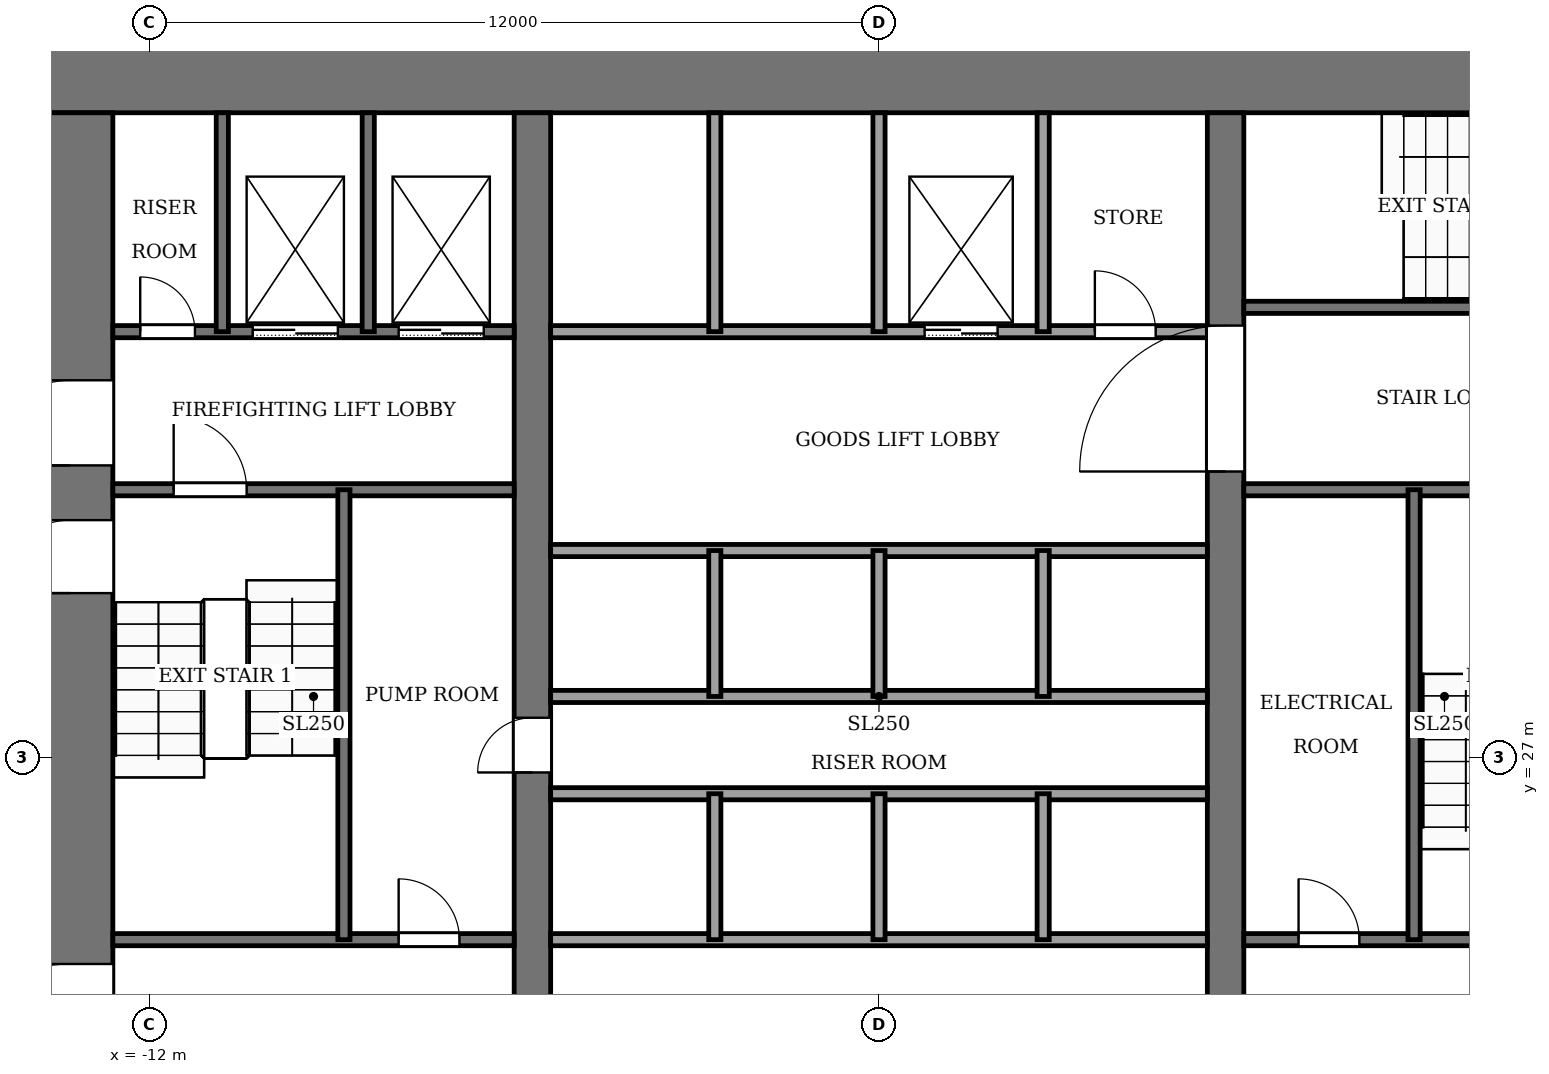
"""IFC4 building model, lengths in metres.
Left out: names, types, materials, properties, quantities, classifications, styles, units other than length and angle.
Written with IfcOpenShell. Run it as: python <this file> out.ifc"""

import sys

from ifc_helpers import new_model, si_unit, direction, frame, frame_2d, origin, place, context, subcontext, project, spatial, rectangle, extrude, element, fill, save


model = new_model("IFC4")
c1 = context("Model", 3, precision=1e-05, world=origin(), true_north=direction((0.0, 1.0)))
c2 = subcontext(c1, "Body", "Model", "MODEL_VIEW")
j1 = project(units=[si_unit("LENGTHUNIT", "METRE"), si_unit("PLANEANGLEUNIT", "RADIAN")], contexts=[c1])
p1 = place(None, origin())
s1 = spatial("IfcSite", under=j1, at=p1, CompositionType="ELEMENT")
p2 = place(p1, origin())
s2 = spatial("IfcBuilding", under=s1, at=p2, CompositionType="ELEMENT")
p3 = place(p2, frame((0.0, 0.0, -6.0)))
s3 = spatial("IfcBuildingStorey", under=s2, at=p3, CompositionType="ELEMENT", Elevation=-6.0)
p4 = place(p3, frame((-14.0, 38.3, 0.0), z_axis=(0.0, 0.0, 1.0), x_axis=(1.0, 0.0, 0.0)))
e1 = element("IfcWall", 1, at=p4, inside=s3, PredefinedType="SHEAR", context=c2, shape_type="SweptSolid", body=[
    extrude(rectangle(XDim=28.0, YDim=1.4, at=frame_2d((14.0, 0.0))), origin(), (0.0, 0.0, 1.0), 5.55),
])
p5 = place(p3, frame((-13.3, 18.4, 0.0), z_axis=(0.0, 0.0, 1.0), x_axis=(0.0, 1.0, 0.0)))
e2 = element("IfcWall", 2, at=p5, inside=s3, PredefinedType="SHEAR", context=c2, shape_type="SweptSolid", body=[
    extrude(rectangle(XDim=19.2, YDim=1.4, at=frame_2d((9.6, 0.0))), origin(), (0.0, 0.0, 1.0), 5.55),
])
p6 = place(p5, frame((2.8, 0.0, 0.0)))
e3 = element("IfcOpeningElement", 3, at=p6, cuts=e2, PredefinedType="OPENING", context=c2, shape_type="SweptSolid", body=[
    extrude(rectangle(XDim=2.4, YDim=2.4, at=frame_2d((1.2, 1.2))), frame((0.0, 0.71, 0.0), z_axis=(0.0, -1.0, 0.0), x_axis=(1.0, 0.0, 0.0)), (0.0, 0.0, 1.0), 1.42),
])
p7 = place(p5, frame((13.4, 0.0, 0.0)))
e4 = element("IfcOpeningElement", 4, at=p7, cuts=e2, PredefinedType="OPENING", context=c2, shape_type="SweptSolid", body=[
    extrude(rectangle(XDim=1.4, YDim=2.2, at=frame_2d((0.7, 1.1))), frame((0.0, 0.71, 0.0), z_axis=(0.0, -1.0, 0.0), x_axis=(1.0, 0.0, 0.0)), (0.0, 0.0, 1.0), 1.42),
])
p8 = place(p5, frame((11.3, 0.0, 0.0)))
e5 = element("IfcOpeningElement", 5, at=p8, cuts=e2, PredefinedType="OPENING", context=c2, shape_type="SweptSolid", body=[
    extrude(rectangle(XDim=1.2, YDim=2.2, at=frame_2d((0.6, 1.1))), frame((0.0, 0.71, 0.0), z_axis=(0.0, -1.0, 0.0), x_axis=(1.0, 0.0, 0.0)), (0.0, 0.0, 1.0), 1.42),
])
p9 = place(p3, frame((-5.7, 18.4, 0.0), z_axis=(0.0, 0.0, 1.0), x_axis=(0.0, 1.0, 0.0)))
e6 = element("IfcWall", 6, at=p9, inside=s3, PredefinedType="SHEAR", context=c2, shape_type="SweptSolid", body=[
    extrude(rectangle(XDim=19.2, YDim=0.6, at=frame_2d((9.6, 0.0))), origin(), (0.0, 0.0, 1.0), 5.55),
])
p10 = place(p9, frame((8.35, 0.0, 0.0)))
e7 = element("IfcOpeningElement", 7, at=p10, cuts=e6, PredefinedType="OPENING", context=c2, shape_type="SweptSolid", body=[
    extrude(rectangle(XDim=0.9, YDim=2.1, at=frame_2d((0.45, 1.05))), frame((0.0, 0.31, 0.0), z_axis=(0.0, -1.0, 0.0), x_axis=(1.0, 0.0, 0.0)), (0.0, 0.0, 1.0), 0.62),
])
p11 = place(p3, frame((5.7, 18.4, 0.0), z_axis=(0.0, 0.0, 1.0), x_axis=(0.0, 1.0, 0.0)))
e8 = element("IfcWall", 8, at=p11, inside=s3, PredefinedType="SHEAR", context=c2, shape_type="SweptSolid", body=[
    extrude(rectangle(XDim=19.2, YDim=0.6, at=frame_2d((9.6, 0.0))), origin(), (0.0, 0.0, 1.0), 5.55),
])
p12 = place(p11, frame((13.3, 0.0, 0.0)))
e9 = element("IfcOpeningElement", 9, at=p12, cuts=e8, PredefinedType="OPENING", context=c2, shape_type="SweptSolid", body=[
    extrude(rectangle(XDim=2.4, YDim=2.4, at=frame_2d((1.2, 1.2))), frame((0.0, 0.31, 0.0), z_axis=(0.0, -1.0, 0.0), x_axis=(1.0, 0.0, 0.0)), (0.0, 0.0, 1.0), 0.62),
])
p13 = place(p3, frame((-12.6, 24.0, 0.0), z_axis=(0.0, 0.0, 1.0), x_axis=(1.0, 0.0, 0.0)))
e10 = element("IfcWall", 10, at=p13, inside=s3, PredefinedType="PARTITIONING", context=c2, shape_type="SweptSolid", body=[
    extrude(rectangle(XDim=6.6, YDim=0.2, at=frame_2d((3.3, 0.0))), origin(), (0.0, 0.0, 1.0), 5.55),
])
p14 = place(p13, frame((4.7, 0.0, 0.0)))
e11 = element("IfcOpeningElement", 11, at=p14, cuts=e10, PredefinedType="OPENING", context=c2, shape_type="SweptSolid", body=[
    extrude(rectangle(XDim=1.0, YDim=2.1, at=frame_2d((0.5, 1.05))), frame((0.0, 0.11, 0.0), z_axis=(0.0, -1.0, 0.0), x_axis=(1.0, 0.0, 0.0)), (0.0, 0.0, 1.0), 0.22),
])
p15 = place(p3, frame((-5.4, 24.0, 0.0), z_axis=(0.0, 0.0, 1.0), x_axis=(1.0, 0.0, 0.0)))
e12 = element("IfcWall", 12, at=p15, inside=s3, PredefinedType="PARTITIONING", context=c2, shape_type="SweptSolid", body=[
    extrude(rectangle(XDim=10.8, YDim=0.2, at=frame_2d((5.4, 0.0))), origin(), (0.0, 0.0, 1.0), 5.55),
])
p16 = place(p3, frame((6.0, 24.0, 0.0), z_axis=(0.0, 0.0, 1.0), x_axis=(1.0, 0.0, 0.0)))
e13 = element("IfcWall", 13, at=p16, inside=s3, PredefinedType="PARTITIONING", context=c2, shape_type="SweptSolid", body=[
    extrude(rectangle(XDim=6.6, YDim=0.2, at=frame_2d((3.3, 0.0))), origin(), (0.0, 0.0, 1.0), 5.55),
])
p17 = place(p16, frame((0.9, 0.0, 0.0)))
e14 = element("IfcOpeningElement", 14, at=p17, cuts=e13, PredefinedType="OPENING", context=c2, shape_type="SweptSolid", body=[
    extrude(rectangle(XDim=1.0, YDim=2.1, at=frame_2d((0.5, 1.05))), frame((0.0, 0.11, 0.0), z_axis=(0.0, -1.0, 0.0), x_axis=(1.0, 0.0, 0.0)), (0.0, 0.0, 1.0), 0.22),
])
p18 = place(p16, frame((4.4, 0.0, 0.0)))
e15 = element("IfcOpeningElement", 15, at=p18, cuts=e13, PredefinedType="OPENING", context=c2, shape_type="SweptSolid", body=[
    extrude(rectangle(XDim=1.2, YDim=2.2, at=frame_2d((0.6, 1.1))), frame((0.0, 0.11, 0.0), z_axis=(0.0, -1.0, 0.0), x_axis=(1.0, 0.0, 0.0)), (0.0, 0.0, 1.0), 0.22),
])
for number, where, z_axis, x_axis in (
    (16, (-5.4, 26.4, 0.0), (0.0, 0.0, 1.0), (1.0, 0.0, 0.0)),
    (17, (-5.4, 28.0, 0.0), (0.0, 0.0, 1.0), (1.0, 0.0, 0.0)),
    (18, (-5.4, 30.4, 0.0), (0.0, 0.0, 1.0), (1.0, 0.0, 0.0)),
):
    element("IfcWall", number, at=place(p3, frame(where, z_axis=z_axis, x_axis=x_axis)), inside=s3, PredefinedType="PARTITIONING", context=c2, shape_type="SweptSolid", body=[
        extrude(rectangle(XDim=10.8, YDim=0.2, at=frame_2d((5.4, 0.0))), origin(), (0.0, 0.0, 1.0), 5.55),
    ])
p19 = place(p3, frame((-12.6, 31.4, 0.0), z_axis=(0.0, 0.0, 1.0), x_axis=(1.0, 0.0, 0.0)))
e19 = element("IfcWall", 19, at=p19, inside=s3, PredefinedType="PARTITIONING", context=c2, shape_type="SweptSolid", body=[
    extrude(rectangle(XDim=6.6, YDim=0.2, at=frame_2d((3.3, 0.0))), origin(), (0.0, 0.0, 1.0), 5.55),
])
p20 = place(p19, frame((1.0, 0.0, 0.0)))
e20 = element("IfcOpeningElement", 20, at=p20, cuts=e19, PredefinedType="OPENING", context=c2, shape_type="SweptSolid", body=[
    extrude(rectangle(XDim=1.2, YDim=2.2, at=frame_2d((0.6, 1.1))), frame((0.0, 0.11, 0.0), z_axis=(0.0, -1.0, 0.0), x_axis=(1.0, 0.0, 0.0)), (0.0, 0.0, 1.0), 0.22),
])
p21 = place(p3, frame((6.0, 31.4, 0.0), z_axis=(0.0, 0.0, 1.0), x_axis=(1.0, 0.0, 0.0)))
e21 = element("IfcWall", 21, at=p21, inside=s3, PredefinedType="PARTITIONING", context=c2, shape_type="SweptSolid", body=[
    extrude(rectangle(XDim=6.6, YDim=0.2, at=frame_2d((3.3, 0.0))), origin(), (0.0, 0.0, 1.0), 5.55),
])
p22 = place(p3, frame((-12.6, 34.0, 0.0), z_axis=(0.0, 0.0, 1.0), x_axis=(1.0, 0.0, 0.0)))
e22 = element("IfcWall", 22, at=p22, inside=s3, PredefinedType="PARTITIONING", context=c2, shape_type="SweptSolid", body=[
    extrude(rectangle(XDim=6.6, YDim=0.2, at=frame_2d((3.3, 0.0))), origin(), (0.0, 0.0, 1.0), 5.55),
])
p23 = place(p22, frame((4.7, 0.0, 0.0)))
e23 = element("IfcOpeningElement", 23, at=p23, cuts=e22, PredefinedType="OPENING", context=c2, shape_type="SweptSolid", body=[
    extrude(rectangle(XDim=1.4, YDim=2.2, at=frame_2d((0.7, 1.1))), frame((0.0, 0.11, 0.0), z_axis=(0.0, -1.0, 0.0), x_axis=(1.0, 0.0, 0.0)), (0.0, 0.0, 1.0), 0.22),
])
p24 = place(p22, frame((2.3, 0.0, 0.0)))
e24 = element("IfcOpeningElement", 24, at=p24, cuts=e22, PredefinedType="OPENING", context=c2, shape_type="SweptSolid", body=[
    extrude(rectangle(XDim=1.4, YDim=2.2, at=frame_2d((0.7, 1.1))), frame((0.0, 0.11, 0.0), z_axis=(0.0, -1.0, 0.0), x_axis=(1.0, 0.0, 0.0)), (0.0, 0.0, 1.0), 0.22),
])
p25 = place(p22, frame((0.45, 0.0, 0.0)))
e25 = element("IfcOpeningElement", 25, at=p25, cuts=e22, PredefinedType="OPENING", context=c2, shape_type="SweptSolid", body=[
    extrude(rectangle(XDim=0.9, YDim=2.1, at=frame_2d((0.45, 1.05))), frame((0.0, 0.11, 0.0), z_axis=(0.0, -1.0, 0.0), x_axis=(1.0, 0.0, 0.0)), (0.0, 0.0, 1.0), 0.22),
])
p26 = place(p3, frame((-5.4, 34.0, 0.0), z_axis=(0.0, 0.0, 1.0), x_axis=(1.0, 0.0, 0.0)))
e26 = element("IfcWall", 26, at=p26, inside=s3, PredefinedType="PARTITIONING", context=c2, shape_type="SweptSolid", body=[
    extrude(rectangle(XDim=10.8, YDim=0.2, at=frame_2d((5.4, 0.0))), origin(), (0.0, 0.0, 1.0), 5.55),
])
p27 = place(p26, frame((6.15, 0.0, 0.0)))
e27 = element("IfcOpeningElement", 27, at=p27, cuts=e26, PredefinedType="OPENING", context=c2, shape_type="SweptSolid", body=[
    extrude(rectangle(XDim=1.2, YDim=2.2, at=frame_2d((0.6, 1.1))), frame((0.0, 0.11, 0.0), z_axis=(0.0, -1.0, 0.0), x_axis=(1.0, 0.0, 0.0)), (0.0, 0.0, 1.0), 0.22),
])
p28 = place(p26, frame((8.95, 0.0, 0.0)))
e28 = element("IfcOpeningElement", 28, at=p28, cuts=e26, PredefinedType="OPENING", context=c2, shape_type="SweptSolid", body=[
    extrude(rectangle(XDim=1.0, YDim=2.1, at=frame_2d((0.5, 1.05))), frame((0.0, 0.11, 0.0), z_axis=(0.0, -1.0, 0.0), x_axis=(1.0, 0.0, 0.0)), (0.0, 0.0, 1.0), 0.22),
])
p29 = place(p3, frame((6.0, 34.4, 0.0), z_axis=(0.0, 0.0, 1.0), x_axis=(1.0, 0.0, 0.0)))
e29 = element("IfcWall", 29, at=p29, inside=s3, PredefinedType="PARTITIONING", context=c2, shape_type="SweptSolid", body=[
    extrude(rectangle(XDim=6.6, YDim=0.2, at=frame_2d((3.3, 0.0))), origin(), (0.0, 0.0, 1.0), 5.55),
])
p30 = place(p29, frame((4.8, 0.0, 0.0)))
e30 = element("IfcOpeningElement", 30, at=p30, cuts=e29, PredefinedType="OPENING", context=c2, shape_type="SweptSolid", body=[
    extrude(rectangle(XDim=1.2, YDim=2.2, at=frame_2d((0.6, 1.1))), frame((0.0, 0.11, 0.0), z_axis=(0.0, -1.0, 0.0), x_axis=(1.0, 0.0, 0.0)), (0.0, 0.0, 1.0), 0.22),
])
p31 = place(p3, frame((-10.8, 34.0, 0.0), z_axis=(0.0, 0.0, 1.0), x_axis=(0.0, 1.0, 0.0)))
e31 = element("IfcWall", 31, at=p31, inside=s3, PredefinedType="PARTITIONING", context=c2, shape_type="SweptSolid", body=[
    extrude(rectangle(XDim=3.6, YDim=0.2, at=frame_2d((1.8, 0.0))), origin(), (0.0, 0.0, 1.0), 5.55),
])
p32 = place(p3, frame((-8.8, 24.0, 0.0), z_axis=(0.0, 0.0, 1.0), x_axis=(0.0, 1.0, 0.0)))
e32 = element("IfcWall", 32, at=p32, inside=s3, PredefinedType="PARTITIONING", context=c2, shape_type="SweptSolid", body=[
    extrude(rectangle(XDim=7.4, YDim=0.2, at=frame_2d((3.7, 0.0))), origin(), (0.0, 0.0, 1.0), 5.55),
])
p33 = place(p3, frame((-8.4, 34.0, 0.0), z_axis=(0.0, 0.0, 1.0), x_axis=(0.0, 1.0, 0.0)))
e33 = element("IfcWall", 33, at=p33, inside=s3, PredefinedType="PARTITIONING", context=c2, shape_type="SweptSolid", body=[
    extrude(rectangle(XDim=3.6, YDim=0.2, at=frame_2d((1.8, 0.0))), origin(), (0.0, 0.0, 1.0), 5.55),
])
for number, where, z_axis, x_axis in (
    (34, (-2.7, 24.0, 0.0), (0.0, 0.0, 1.0), (0.0, 1.0, 0.0)),
    (35, (-2.7, 28.0, 0.0), (0.0, 0.0, 1.0), (0.0, 1.0, 0.0)),
):
    element("IfcWall", number, at=place(p3, frame(where, z_axis=z_axis, x_axis=x_axis)), inside=s3, PredefinedType="PARTITIONING", context=c2, shape_type="SweptSolid", body=[
        extrude(rectangle(XDim=2.4, YDim=0.2, at=frame_2d((1.2, 0.0))), origin(), (0.0, 0.0, 1.0), 5.55),
    ])
p34 = place(p3, frame((-2.7, 34.0, 0.0), z_axis=(0.0, 0.0, 1.0), x_axis=(0.0, 1.0, 0.0)))
e36 = element("IfcWall", 36, at=p34, inside=s3, PredefinedType="PARTITIONING", context=c2, shape_type="SweptSolid", body=[
    extrude(rectangle(XDim=3.6, YDim=0.2, at=frame_2d((1.8, 0.0))), origin(), (0.0, 0.0, 1.0), 5.55),
])
for number, where, z_axis, x_axis in (
    (37, (0.0, 24.0, 0.0), (0.0, 0.0, 1.0), (0.0, 1.0, 0.0)),
    (38, (0.0, 28.0, 0.0), (0.0, 0.0, 1.0), (0.0, 1.0, 0.0)),
):
    element("IfcWall", number, at=place(p3, frame(where, z_axis=z_axis, x_axis=x_axis)), inside=s3, PredefinedType="PARTITIONING", context=c2, shape_type="SweptSolid", body=[
        extrude(rectangle(XDim=2.4, YDim=0.2, at=frame_2d((1.2, 0.0))), origin(), (0.0, 0.0, 1.0), 5.55),
    ])
p35 = place(p3, frame((0.0, 34.0, 0.0), z_axis=(0.0, 0.0, 1.0), x_axis=(0.0, 1.0, 0.0)))
e39 = element("IfcWall", 39, at=p35, inside=s3, PredefinedType="PARTITIONING", context=c2, shape_type="SweptSolid", body=[
    extrude(rectangle(XDim=3.6, YDim=0.2, at=frame_2d((1.8, 0.0))), origin(), (0.0, 0.0, 1.0), 5.55),
])
for number, where, z_axis, x_axis in (
    (40, (2.7, 24.0, 0.0), (0.0, 0.0, 1.0), (0.0, 1.0, 0.0)),
    (41, (2.7, 28.0, 0.0), (0.0, 0.0, 1.0), (0.0, 1.0, 0.0)),
):
    element("IfcWall", number, at=place(p3, frame(where, z_axis=z_axis, x_axis=x_axis)), inside=s3, PredefinedType="PARTITIONING", context=c2, shape_type="SweptSolid", body=[
        extrude(rectangle(XDim=2.4, YDim=0.2, at=frame_2d((1.2, 0.0))), origin(), (0.0, 0.0, 1.0), 5.55),
    ])
p36 = place(p3, frame((2.7, 34.0, 0.0), z_axis=(0.0, 0.0, 1.0), x_axis=(0.0, 1.0, 0.0)))
e42 = element("IfcWall", 42, at=p36, inside=s3, PredefinedType="PARTITIONING", context=c2, shape_type="SweptSolid", body=[
    extrude(rectangle(XDim=3.6, YDim=0.2, at=frame_2d((1.8, 0.0))), origin(), (0.0, 0.0, 1.0), 5.55),
])
p37 = place(p3, frame((8.8, 24.0, 0.0), z_axis=(0.0, 0.0, 1.0), x_axis=(0.0, 1.0, 0.0)))
e43 = element("IfcWall", 43, at=p37, inside=s3, PredefinedType="PARTITIONING", context=c2, shape_type="SweptSolid", body=[
    extrude(rectangle(XDim=7.4, YDim=0.2, at=frame_2d((3.7, 0.0))), origin(), (0.0, 0.0, 1.0), 5.55),
])
p38 = place(p27, origin())
e44 = element("IfcDoor", 44, at=p38, inside=s3, OperationType="SLIDING_TO_LEFT", PredefinedType="DOOR", context=c2, shape_type="SweptSolid", body=[
    extrude(rectangle(XDim=1.2, YDim=2.2, at=frame_2d((0.6, 1.1))), frame((0.0, 0.025, 0.0), z_axis=(0.0, -1.0, 0.0), x_axis=(1.0, 0.0, 0.0)), (0.0, 0.0, 1.0), 0.05),
])
fill(e27, e44)
p39 = place(p23, origin())
e45 = element("IfcDoor", 45, at=p39, inside=s3, OperationType="SLIDING_TO_LEFT", PredefinedType="DOOR", context=c2, shape_type="SweptSolid", body=[
    extrude(rectangle(XDim=1.4, YDim=2.2, at=frame_2d((0.7, 1.1))), frame((0.0, 0.025, 0.0), z_axis=(0.0, -1.0, 0.0), x_axis=(1.0, 0.0, 0.0)), (0.0, 0.0, 1.0), 0.05),
])
fill(e23, e45)
p40 = place(p24, origin())
e46 = element("IfcDoor", 46, at=p40, inside=s3, OperationType="SLIDING_TO_LEFT", PredefinedType="DOOR", context=c2, shape_type="SweptSolid", body=[
    extrude(rectangle(XDim=1.4, YDim=2.2, at=frame_2d((0.7, 1.1))), frame((0.0, 0.025, 0.0), z_axis=(0.0, -1.0, 0.0), x_axis=(1.0, 0.0, 0.0)), (0.0, 0.0, 1.0), 0.05),
])
fill(e24, e46)
p41 = place(p25, origin())
e47 = element("IfcDoor", 47, at=p41, inside=s3, OperationType="SINGLE_SWING_RIGHT", PredefinedType="DOOR", context=c2, shape_type="SweptSolid", body=[
    extrude(rectangle(XDim=0.9, YDim=2.1, at=frame_2d((0.45, 1.05))), frame((0.0, 0.025, 0.0), z_axis=(0.0, -1.0, 0.0), x_axis=(1.0, 0.0, 0.0)), (0.0, 0.0, 1.0), 0.05),
])
fill(e25, e47)
p42 = place(p14, origin())
e48 = element("IfcDoor", 48, at=p42, inside=s3, OperationType="SINGLE_SWING_RIGHT", PredefinedType="DOOR", context=c2, shape_type="SweptSolid", body=[
    extrude(rectangle(XDim=1.0, YDim=2.1, at=frame_2d((0.5, 1.05))), frame((0.0, 0.025, 0.0), z_axis=(0.0, -1.0, 0.0), x_axis=(1.0, 0.0, 0.0)), (0.0, 0.0, 1.0), 0.05),
])
fill(e11, e48)
p43 = place(p17, origin())
e49 = element("IfcDoor", 49, at=p43, inside=s3, OperationType="SINGLE_SWING_LEFT", PredefinedType="DOOR", context=c2, shape_type="SweptSolid", body=[
    extrude(rectangle(XDim=1.0, YDim=2.1, at=frame_2d((0.5, 1.05))), frame((0.0, 0.025, 0.0), z_axis=(0.0, -1.0, 0.0), x_axis=(1.0, 0.0, 0.0)), (0.0, 0.0, 1.0), 0.05),
])
fill(e14, e49)
p44 = place(p28, origin())
e50 = element("IfcDoor", 50, at=p44, inside=s3, OperationType="SINGLE_SWING_LEFT", PredefinedType="DOOR", context=c2, shape_type="SweptSolid", body=[
    extrude(rectangle(XDim=1.0, YDim=2.1, at=frame_2d((0.5, 1.05))), frame((0.0, 0.025, 0.0), z_axis=(0.0, -1.0, 0.0), x_axis=(1.0, 0.0, 0.0)), (0.0, 0.0, 1.0), 0.05),
])
fill(e28, e50)
p45 = place(p10, origin())
e51 = element("IfcDoor", 51, at=p45, inside=s3, OperationType="SINGLE_SWING_RIGHT", PredefinedType="DOOR", context=c2, shape_type="SweptSolid", body=[
    extrude(rectangle(XDim=0.9, YDim=2.1, at=frame_2d((0.45, 1.05))), frame((0.0, 0.025, 0.0), z_axis=(0.0, -1.0, 0.0), x_axis=(1.0, 0.0, 0.0)), (0.0, 0.0, 1.0), 0.05),
])
fill(e7, e51)
p46 = place(p20, origin())
e52 = element("IfcDoor", 52, at=p46, inside=s3, OperationType="SINGLE_SWING_RIGHT", PredefinedType="DOOR", context=c2, shape_type="SweptSolid", body=[
    extrude(rectangle(XDim=1.2, YDim=2.2, at=frame_2d((0.6, 1.1))), frame((0.0, 0.025, 0.0), z_axis=(0.0, -1.0, 0.0), x_axis=(1.0, 0.0, 0.0)), (0.0, 0.0, 1.0), 0.05),
])
fill(e20, e52)
p47 = place(p12, origin())
e53 = element("IfcDoor", 53, at=p47, inside=s3, OperationType="DOUBLE_DOOR_SINGLE_SWING", PredefinedType="DOOR", context=c2, shape_type="SweptSolid", body=[
    extrude(rectangle(XDim=2.4, YDim=2.4, at=frame_2d((1.2, 1.2))), frame((0.0, 0.025, 0.0), z_axis=(0.0, -1.0, 0.0), x_axis=(1.0, 0.0, 0.0)), (0.0, 0.0, 1.0), 0.05),
])
fill(e9, e53)
p48 = place(p6, origin())
e54 = element("IfcDoor", 54, at=p48, inside=s3, OperationType="DOUBLE_DOOR_SINGLE_SWING", PredefinedType="DOOR", context=c2, shape_type="SweptSolid", body=[
    extrude(rectangle(XDim=2.4, YDim=2.4, at=frame_2d((1.2, 1.2))), frame((0.0, 0.025, 0.0), z_axis=(0.0, -1.0, 0.0), x_axis=(1.0, 0.0, 0.0)), (0.0, 0.0, 1.0), 0.05),
])
fill(e3, e54)
p49 = place(p7, origin())
e55 = element("IfcDoor", 55, at=p49, inside=s3, OperationType="SINGLE_SWING_RIGHT", PredefinedType="DOOR", context=c2, shape_type="SweptSolid", body=[
    extrude(rectangle(XDim=1.4, YDim=2.2, at=frame_2d((0.7, 1.1))), frame((0.0, 0.025, 0.0), z_axis=(0.0, -1.0, 0.0), x_axis=(1.0, 0.0, 0.0)), (0.0, 0.0, 1.0), 0.05),
])
fill(e4, e55)
p50 = place(p8, origin())
e56 = element("IfcDoor", 56, at=p50, inside=s3, OperationType="SINGLE_SWING_LEFT", PredefinedType="DOOR", context=c2, shape_type="SweptSolid", body=[
    extrude(rectangle(XDim=1.2, YDim=2.2, at=frame_2d((0.6, 1.1))), frame((0.0, 0.025, 0.0), z_axis=(0.0, -1.0, 0.0), x_axis=(1.0, 0.0, 0.0)), (0.0, 0.0, 1.0), 0.05),
])
fill(e5, e56)
save(model, sys.argv[1])
